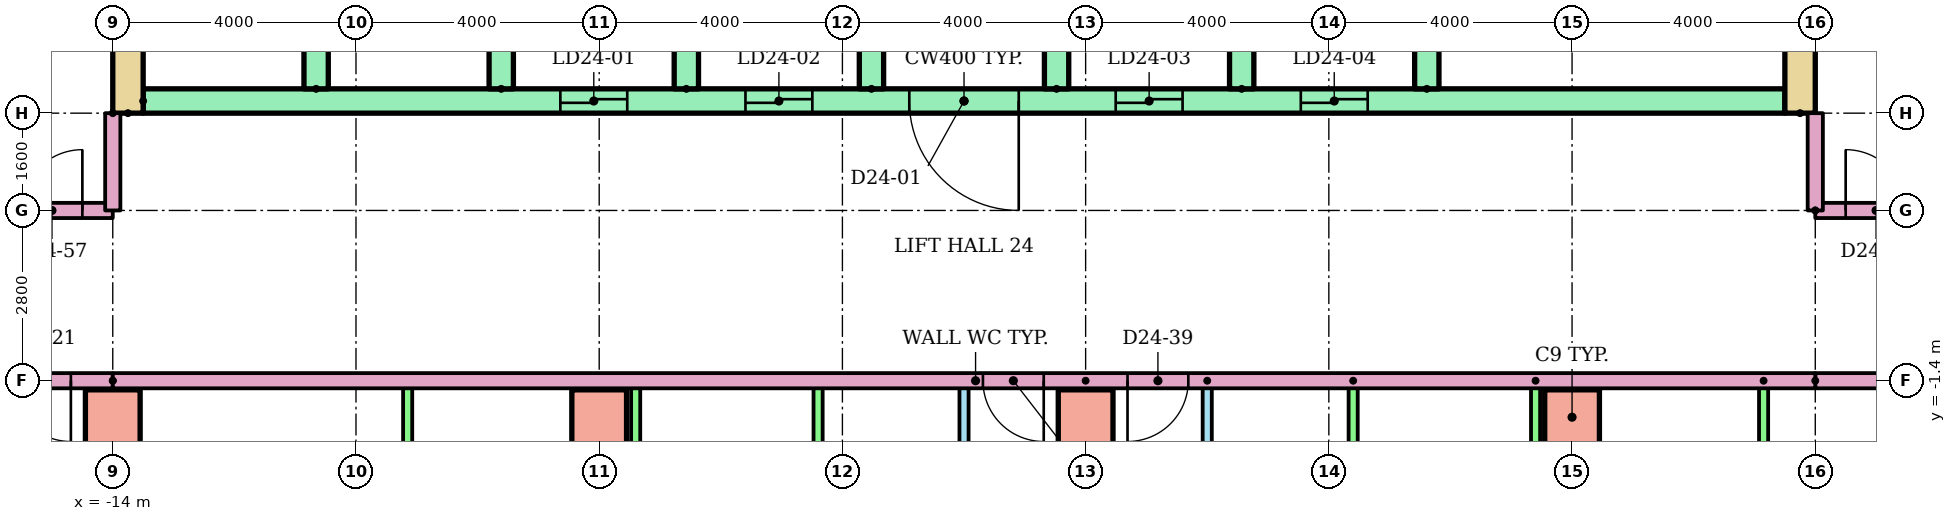
"""IFC4 building model, lengths in metres.
Left out: names, types, materials, properties, quantities, classifications, styles, units other than length and angle.
Written with IfcOpenShell. Run it as: python <this file> out.ifc"""

import sys

from ifc_helpers import new_model, si_unit, direction, frame, frame_2d, origin, origin_2d, place, context, subcontext, project, spatial, rectangle, extrude, element, fill, save


model = new_model("IFC4")
c1 = context("Model", 3, precision=1e-05, world=origin(), true_north=direction((0.0, 1.0)))
c2 = subcontext(c1, "Body", "Model", "MODEL_VIEW")
j1 = project(units=[si_unit("LENGTHUNIT", "METRE"), si_unit("PLANEANGLEUNIT", "RADIAN")], contexts=[c1])
p1 = place(None, origin())
s1 = spatial("IfcSite", under=j1, at=p1, CompositionType="ELEMENT")
p2 = place(p1, origin())
s2 = spatial("IfcBuilding", under=s1, at=p2, CompositionType="ELEMENT")
p3 = place(p2, frame((0.0, 0.0, 93.5)))
s3 = spatial("IfcBuildingStorey", under=s2, at=p3, CompositionType="ELEMENT", Elevation=93.5)
for number, where in (
    (1, (-14.0, -2.0, 0.0)),
    (2, (-6.0, -2.0, 0.0)),
    (3, (2.0, -2.0, 0.0)),
    (4, (10.0, -2.0, 0.0)),
):
    element("IfcColumn", number, at=place(p3, frame(where)), inside=s3, PredefinedType="COLUMN", context=c2, shape_type="SweptSolid", body=[
        extrude(rectangle(XDim=0.9, YDim=0.9, at=origin_2d()), origin(), (0.0, 0.0, 1.0), 3.2),
    ])
for number, where, z_axis, x_axis in (
    (5, (-13.75, 3.0, 0.0), (0.0, 0.0, 1.0), (0.0, 1.0, 0.0)),
    (6, (13.75, 3.0, 0.0), (0.0, 0.0, 1.0), (0.0, 1.0, 0.0)),
):
    element("IfcWall", number, at=place(p3, frame(where, z_axis=z_axis, x_axis=x_axis)), inside=s3, PredefinedType="SHEAR", context=c2, shape_type="SweptSolid", body=[
        extrude(rectangle(XDim=17.0, YDim=0.5, at=frame_2d((8.5, 0.0))), origin(), (0.0, 0.0, 1.0), 2.92),
    ])
p4 = place(p3, frame((-13.5, 3.2, 0.0)))
e7 = element("IfcWall", 7, at=p4, inside=s3, PredefinedType="SHEAR", context=c2, shape_type="SweptSolid", body=[
    extrude(rectangle(XDim=27.0, YDim=0.4, at=frame_2d((13.5, 0.0))), origin(), (0.0, 0.0, 1.0), 2.92),
])
p5 = place(p4, frame((6.861, 0.0, 0.0)))
e8 = element("IfcOpeningElement", 8, at=p5, cuts=e7, PredefinedType="OPENING", context=c2, shape_type="SweptSolid", body=[
    extrude(rectangle(XDim=1.1, YDim=2.1, at=frame_2d((0.55, 1.05))), frame((0.0, 0.21, 0.0), z_axis=(0.0, -1.0, 0.0), x_axis=(1.0, 0.0, 0.0)), (0.0, 0.0, 1.0), 0.42),
])
p6 = place(p4, frame((9.906, 0.0, 0.0)))
e9 = element("IfcOpeningElement", 9, at=p6, cuts=e7, PredefinedType="OPENING", context=c2, shape_type="SweptSolid", body=[
    extrude(rectangle(XDim=1.1, YDim=2.1, at=frame_2d((0.55, 1.05))), frame((0.0, 0.21, 0.0), z_axis=(0.0, -1.0, 0.0), x_axis=(1.0, 0.0, 0.0)), (0.0, 0.0, 1.0), 0.42),
])
p7 = place(p4, frame((15.994, 0.0, 0.0)))
e10 = element("IfcOpeningElement", 10, at=p7, cuts=e7, PredefinedType="OPENING", context=c2, shape_type="SweptSolid", body=[
    extrude(rectangle(XDim=1.1, YDim=2.1, at=frame_2d((0.55, 1.05))), frame((0.0, 0.21, 0.0), z_axis=(0.0, -1.0, 0.0), x_axis=(1.0, 0.0, 0.0)), (0.0, 0.0, 1.0), 0.42),
])
p8 = place(p4, frame((19.039, 0.0, 0.0)))
e11 = element("IfcOpeningElement", 11, at=p8, cuts=e7, PredefinedType="OPENING", context=c2, shape_type="SweptSolid", body=[
    extrude(rectangle(XDim=1.1, YDim=2.1, at=frame_2d((0.55, 1.05))), frame((0.0, 0.21, 0.0), z_axis=(0.0, -1.0, 0.0), x_axis=(1.0, 0.0, 0.0)), (0.0, 0.0, 1.0), 0.42),
])
p9 = place(p4, frame((12.6, 0.0, 0.0)))
e12 = element("IfcOpeningElement", 12, at=p9, cuts=e7, PredefinedType="OPENING", context=c2, shape_type="SweptSolid", body=[
    extrude(rectangle(XDim=1.8, YDim=2.1, at=frame_2d((0.9, 1.05))), frame((0.0, 0.21, 0.0), z_axis=(0.0, -1.0, 0.0), x_axis=(1.0, 0.0, 0.0)), (0.0, 0.0, 1.0), 0.42),
])
for number, where, z_axis, x_axis in (
    (13, (-10.656, 3.4, 0.0), (0.0, 0.0, 1.0), (0.0, 1.0, 0.0)),
    (14, (-7.611, 3.4, 0.0), (0.0, 0.0, 1.0), (0.0, 1.0, 0.0)),
    (15, (-4.567, 3.4, 0.0), (0.0, 0.0, 1.0), (0.0, 1.0, 0.0)),
    (16, (-1.522, 3.4, 0.0), (0.0, 0.0, 1.0), (0.0, 1.0, 0.0)),
    (17, (1.522, 3.4, 0.0), (0.0, 0.0, 1.0), (0.0, 1.0, 0.0)),
    (18, (4.567, 3.4, 0.0), (0.0, 0.0, 1.0), (0.0, 1.0, 0.0)),
    (19, (7.611, 3.4, 0.0), (0.0, 0.0, 1.0), (0.0, 1.0, 0.0)),
):
    element("IfcWall", number, at=place(p3, frame(where, z_axis=z_axis, x_axis=x_axis)), inside=s3, PredefinedType="SHEAR", context=c2, shape_type="SweptSolid", body=[
        extrude(rectangle(XDim=3.0, YDim=0.4, at=frame_2d((1.5, 0.0))), origin(), (0.0, 0.0, 1.0), 2.92),
    ])
p10 = place(p3, frame((0.0, -9.1, 0.0), z_axis=(0.0, 0.0, 1.0), x_axis=(0.0, 1.0, 0.0)))
e20 = element("IfcWall", 20, at=p10, inside=s3, PredefinedType="PARTITIONING", context=c2, shape_type="SweptSolid", body=[
    extrude(rectangle(XDim=7.7, YDim=0.15, at=frame_2d((3.85, 0.0))), origin(), (0.0, 0.0, 1.0), 2.4),
])
p11 = place(p10, frame((5.125, 0.0, 0.0)))
e21 = element("IfcOpeningElement", 21, at=p11, cuts=e20, PredefinedType="OPENING", context=c2, shape_type="SweptSolid", body=[
    extrude(rectangle(XDim=0.9, YDim=2.1, at=frame_2d((0.45, 1.05))), frame((0.0, 0.085, 0.0), z_axis=(0.0, -1.0, 0.0), x_axis=(1.0, 0.0, 0.0)), (0.0, 0.0, 1.0), 0.17),
])
p12 = place(p10, frame((1.325, 0.0, 0.0)))
e22 = element("IfcOpeningElement", 22, at=p12, cuts=e20, PredefinedType="OPENING", context=c2, shape_type="SweptSolid", body=[
    extrude(rectangle(XDim=0.8, YDim=2.1, at=frame_2d((0.4, 1.05))), frame((0.0, 0.085, 0.0), z_axis=(0.0, -1.0, 0.0), x_axis=(1.0, 0.0, 0.0)), (0.0, 0.0, 1.0), 0.17),
])
for number, where, z_axis, x_axis in (
    (23, (-2.4, -9.1, 0.0), (0.0, 0.0, 1.0), (0.0, 1.0, 0.0)),
    (24, (-5.4, -9.1, 0.0), (0.0, 0.0, 1.0), (0.0, 1.0, 0.0)),
    (25, (-9.15, -9.1, 0.0), (0.0, 0.0, 1.0), (0.0, 1.0, 0.0)),
):
    element("IfcWall", number, at=place(p3, frame(where, z_axis=z_axis, x_axis=x_axis)), inside=s3, PredefinedType="PARTITIONING", context=c2, shape_type="SweptSolid", body=[
        extrude(rectangle(XDim=7.7, YDim=0.15, at=frame_2d((3.85, 0.0))), origin(), (0.0, 0.0, 1.0), 2.4),
    ])
p13 = place(p3, frame((-14.0, -1.4, 0.0), z_axis=(0.0, 0.0, 1.0), x_axis=(0.0, -1.0, 0.0)))
e26 = element("IfcWall", 26, at=p13, inside=s3, PredefinedType="PARTITIONING", context=c2, shape_type="SweptSolid", body=[
    extrude(rectangle(XDim=14.81, YDim=0.25, at=frame_2d((7.405, 0.0))), origin(), (0.0, 0.0, 1.0), 2.4),
])
p14 = place(p3, frame((4.0, -1.4, 0.0), z_axis=(0.0, 0.0, 1.0), x_axis=(0.0, -1.0, 0.0)))
e27 = element("IfcWall", 27, at=p14, inside=s3, PredefinedType="PARTITIONING", context=c2, shape_type="SweptSolid", body=[
    extrude(rectangle(XDim=7.7, YDim=0.15, at=frame_2d((3.85, 0.0))), origin(), (0.0, 0.0, 1.0), 2.4),
])
p15 = place(p14, frame((1.675, 0.0, 0.0)))
e28 = element("IfcOpeningElement", 28, at=p15, cuts=e27, PredefinedType="OPENING", context=c2, shape_type="SweptSolid", body=[
    extrude(rectangle(XDim=0.9, YDim=2.1, at=frame_2d((0.45, 1.05))), frame((0.0, 0.085, 0.0), z_axis=(0.0, -1.0, 0.0), x_axis=(1.0, 0.0, 0.0)), (0.0, 0.0, 1.0), 0.17),
])
p16 = place(p14, frame((5.575, 0.0, 0.0)))
e29 = element("IfcOpeningElement", 29, at=p16, cuts=e27, PredefinedType="OPENING", context=c2, shape_type="SweptSolid", body=[
    extrude(rectangle(XDim=0.8, YDim=2.1, at=frame_2d((0.4, 1.05))), frame((0.0, 0.085, 0.0), z_axis=(0.0, -1.0, 0.0), x_axis=(1.0, 0.0, 0.0)), (0.0, 0.0, 1.0), 0.17),
])
for number, where, z_axis, x_axis in (
    (30, (6.4, -1.4, 0.0), (0.0, 0.0, 1.0), (0.0, -1.0, 0.0)),
    (31, (9.4, -1.4, 0.0), (0.0, 0.0, 1.0), (0.0, -1.0, 0.0)),
    (32, (13.15, -1.4, 0.0), (0.0, 0.0, 1.0), (0.0, -1.0, 0.0)),
):
    element("IfcWall", number, at=place(p3, frame(where, z_axis=z_axis, x_axis=x_axis)), inside=s3, PredefinedType="PARTITIONING", context=c2, shape_type="SweptSolid", body=[
        extrude(rectangle(XDim=7.7, YDim=0.15, at=frame_2d((3.85, 0.0))), origin(), (0.0, 0.0, 1.0), 2.4),
    ])
p17 = place(p3, frame((2.0, -1.4, 0.0), z_axis=(0.0, 0.0, 1.0), x_axis=(0.0, -1.0, 0.0)))
e33 = element("IfcWall", 33, at=p17, inside=s3, PredefinedType="PARTITIONING", context=c2, shape_type="SweptSolid", body=[
    extrude(rectangle(XDim=14.81, YDim=0.25, at=frame_2d((7.405, 0.0))), origin(), (0.0, 0.0, 1.0), 2.4),
])
p18 = place(p3, frame((-14.0, -1.4, 0.0), z_axis=(0.0, 0.0, 1.0), x_axis=(-1.0, 0.0, 0.0)))
e34 = element("IfcWall", 34, at=p18, inside=s3, PredefinedType="PARTITIONING", context=c2, shape_type="SweptSolid", body=[
    extrude(rectangle(XDim=14.62, YDim=0.25, at=frame_2d((7.31, 0.0))), origin(), (0.0, 0.0, 1.0), 2.4),
])
p19 = place(p18, frame((0.689, 0.0, 0.0)))
e35 = element("IfcOpeningElement", 35, at=p19, cuts=e34, PredefinedType="OPENING", context=c2, shape_type="SweptSolid", body=[
    extrude(rectangle(XDim=1.0, YDim=2.1, at=frame_2d((0.5, 1.05))), frame((0.0, 0.135, 0.0), z_axis=(0.0, -1.0, 0.0), x_axis=(1.0, 0.0, 0.0)), (0.0, 0.0, 1.0), 0.27),
])
p20 = place(p3, frame((29.0, -1.4, 0.0), z_axis=(0.0, 0.0, 1.0), x_axis=(-1.0, 0.0, 0.0)))
e36 = element("IfcWall", 36, at=p20, inside=s3, PredefinedType="PARTITIONING", context=c2, shape_type="SweptSolid", body=[
    extrude(rectangle(XDim=15.0, YDim=0.25, at=frame_2d((7.5, 0.0))), origin(), (0.0, 0.0, 1.0), 2.4),
])
p21 = place(p20, frame((9.311, 0.0, 0.0)))
e37 = element("IfcOpeningElement", 37, at=p21, cuts=e36, PredefinedType="OPENING", context=c2, shape_type="SweptSolid", body=[
    extrude(rectangle(XDim=1.0, YDim=2.1, at=frame_2d((0.5, 1.05))), frame((0.0, 0.135, 0.0), z_axis=(0.0, -1.0, 0.0), x_axis=(1.0, 0.0, 0.0)), (0.0, 0.0, 1.0), 0.27),
])
p22 = place(p3, frame((-28.62, 1.4, 0.0)))
e38 = element("IfcWall", 38, at=p22, inside=s3, PredefinedType="PARTITIONING", context=c2, shape_type="SweptSolid", body=[
    extrude(rectangle(XDim=14.62, YDim=0.25, at=frame_2d((7.31, 0.0))), origin(), (0.0, 0.0, 1.0), 2.4),
])
p23 = place(p22, frame((13.12, 0.0, 0.0)))
e39 = element("IfcOpeningElement", 39, at=p23, cuts=e38, PredefinedType="OPENING", context=c2, shape_type="SweptSolid", body=[
    extrude(rectangle(XDim=1.0, YDim=2.1, at=frame_2d((0.5, 1.05))), frame((0.0, 0.135, 0.0), z_axis=(0.0, -1.0, 0.0), x_axis=(1.0, 0.0, 0.0)), (0.0, 0.0, 1.0), 0.27),
])
p24 = place(p3, frame((14.0, 1.4, 0.0)))
e40 = element("IfcWall", 40, at=p24, inside=s3, PredefinedType="PARTITIONING", context=c2, shape_type="SweptSolid", body=[
    extrude(rectangle(XDim=15.0, YDim=0.25, at=frame_2d((7.5, 0.0))), origin(), (0.0, 0.0, 1.0), 2.4),
])
p25 = place(p24, frame((0.5, 0.0, 0.0)))
e41 = element("IfcOpeningElement", 41, at=p25, cuts=e40, PredefinedType="OPENING", context=c2, shape_type="SweptSolid", body=[
    extrude(rectangle(XDim=1.0, YDim=2.1, at=frame_2d((0.5, 1.05))), frame((0.0, 0.135, 0.0), z_axis=(0.0, -1.0, 0.0), x_axis=(1.0, 0.0, 0.0)), (0.0, 0.0, 1.0), 0.27),
])
p26 = place(p24, frame((12.689, 0.0, 0.0)))
e42 = element("IfcOpeningElement", 42, at=p26, cuts=e40, PredefinedType="OPENING", context=c2, shape_type="SweptSolid", body=[
    extrude(rectangle(XDim=1.0, YDim=2.1, at=frame_2d((0.5, 1.05))), frame((0.0, 0.135, 0.0), z_axis=(0.0, -1.0, 0.0), x_axis=(1.0, 0.0, 0.0)), (0.0, 0.0, 1.0), 0.27),
])
p27 = place(p3, frame((14.0, -1.4, 0.0), z_axis=(0.0, 0.0, 1.0), x_axis=(-1.0, 0.0, 0.0)))
e43 = element("IfcWall", 43, at=p27, inside=s3, PredefinedType="PARTITIONING", context=c2, shape_type="SweptSolid", body=[
    extrude(rectangle(XDim=28.0, YDim=0.25, at=frame_2d((14.0, 0.0))), origin(), (0.0, 0.0, 1.0), 2.4),
])
p28 = place(p27, frame((12.689, 0.0, 0.0)))
e44 = element("IfcOpeningElement", 44, at=p28, cuts=e43, PredefinedType="OPENING", context=c2, shape_type="SweptSolid", body=[
    extrude(rectangle(XDim=1.0, YDim=2.1, at=frame_2d((0.5, 1.05))), frame((0.0, 0.135, 0.0), z_axis=(0.0, -1.0, 0.0), x_axis=(1.0, 0.0, 0.0)), (0.0, 0.0, 1.0), 0.27),
])
p29 = place(p27, frame((10.311, 0.0, 0.0)))
e45 = element("IfcOpeningElement", 45, at=p29, cuts=e43, PredefinedType="OPENING", context=c2, shape_type="SweptSolid", body=[
    extrude(rectangle(XDim=1.0, YDim=2.1, at=frame_2d((0.5, 1.05))), frame((0.0, 0.135, 0.0), z_axis=(0.0, -1.0, 0.0), x_axis=(1.0, 0.0, 0.0)), (0.0, 0.0, 1.0), 0.27),
])
for number, where, z_axis, x_axis in (
    (46, (-14.0, 3.0, 0.0), (0.0, 0.0, 1.0), (0.0, -1.0, 0.0)),
    (47, (14.0, 1.4, 0.0), (0.0, 0.0, 1.0), (0.0, 1.0, 0.0)),
):
    element("IfcWall", number, at=place(p3, frame(where, z_axis=z_axis, x_axis=x_axis)), inside=s3, PredefinedType="PARTITIONING", context=c2, shape_type="SweptSolid", body=[
        extrude(rectangle(XDim=1.6, YDim=0.25, at=frame_2d((0.8, 0.0))), origin(), (0.0, 0.0, 1.0), 2.4),
    ])
p30 = place(p5, origin())
e48 = element("IfcDoor", 48, at=p30, inside=s3, OperationType="SLIDING_TO_LEFT", PredefinedType="DOOR", context=c2, shape_type="SweptSolid", body=[
    extrude(rectangle(XDim=1.1, YDim=2.1, at=frame_2d((0.55, 1.05))), frame((0.0, 0.025, 0.0), z_axis=(0.0, -1.0, 0.0), x_axis=(1.0, 0.0, 0.0)), (0.0, 0.0, 1.0), 0.05),
])
fill(e8, e48)
p31 = place(p6, origin())
e49 = element("IfcDoor", 49, at=p31, inside=s3, OperationType="SLIDING_TO_LEFT", PredefinedType="DOOR", context=c2, shape_type="SweptSolid", body=[
    extrude(rectangle(XDim=1.1, YDim=2.1, at=frame_2d((0.55, 1.05))), frame((0.0, 0.025, 0.0), z_axis=(0.0, -1.0, 0.0), x_axis=(1.0, 0.0, 0.0)), (0.0, 0.0, 1.0), 0.05),
])
fill(e9, e49)
p32 = place(p7, origin())
e50 = element("IfcDoor", 50, at=p32, inside=s3, OperationType="SLIDING_TO_LEFT", PredefinedType="DOOR", context=c2, shape_type="SweptSolid", body=[
    extrude(rectangle(XDim=1.1, YDim=2.1, at=frame_2d((0.55, 1.05))), frame((0.0, 0.025, 0.0), z_axis=(0.0, -1.0, 0.0), x_axis=(1.0, 0.0, 0.0)), (0.0, 0.0, 1.0), 0.05),
])
fill(e10, e50)
p33 = place(p8, origin())
e51 = element("IfcDoor", 51, at=p33, inside=s3, OperationType="SLIDING_TO_LEFT", PredefinedType="DOOR", context=c2, shape_type="SweptSolid", body=[
    extrude(rectangle(XDim=1.1, YDim=2.1, at=frame_2d((0.55, 1.05))), frame((0.0, 0.025, 0.0), z_axis=(0.0, -1.0, 0.0), x_axis=(1.0, 0.0, 0.0)), (0.0, 0.0, 1.0), 0.05),
])
fill(e11, e51)
p34 = place(p9, frame((1.8, 0.0, 0.0), z_axis=(0.0, 0.0, 1.0), x_axis=(-1.0, 0.0, 0.0)))
e52 = element("IfcDoor", 52, at=p34, inside=s3, OperationType="DOUBLE_DOOR_SINGLE_SWING", PredefinedType="DOOR", context=c2, shape_type="SweptSolid", body=[
    extrude(rectangle(XDim=1.8, YDim=2.1, at=frame_2d((0.9, 1.05))), frame((0.0, 0.025, 0.0), z_axis=(0.0, -1.0, 0.0), x_axis=(1.0, 0.0, 0.0)), (0.0, 0.0, 1.0), 0.05),
])
fill(e12, e52)
p35 = place(p19, origin())
e53 = element("IfcDoor", 53, at=p35, inside=s3, OperationType="SINGLE_SWING_LEFT", PredefinedType="DOOR", context=c2, shape_type="SweptSolid", body=[
    extrude(rectangle(XDim=1.0, YDim=2.1, at=frame_2d((0.5, 1.05))), frame((0.0, 0.025, 0.0), z_axis=(0.0, -1.0, 0.0), x_axis=(1.0, 0.0, 0.0)), (0.0, 0.0, 1.0), 0.05),
])
fill(e35, e53)
p36 = place(p28, origin())
e54 = element("IfcDoor", 54, at=p36, inside=s3, OperationType="SINGLE_SWING_LEFT", PredefinedType="DOOR", context=c2, shape_type="SweptSolid", body=[
    extrude(rectangle(XDim=1.0, YDim=2.1, at=frame_2d((0.5, 1.05))), frame((0.0, 0.025, 0.0), z_axis=(0.0, -1.0, 0.0), x_axis=(1.0, 0.0, 0.0)), (0.0, 0.0, 1.0), 0.05),
])
fill(e44, e54)
p37 = place(p29, origin())
e55 = element("IfcDoor", 55, at=p37, inside=s3, OperationType="SINGLE_SWING_RIGHT", PredefinedType="DOOR", context=c2, shape_type="SweptSolid", body=[
    extrude(rectangle(XDim=1.0, YDim=2.1, at=frame_2d((0.5, 1.05))), frame((0.0, 0.025, 0.0), z_axis=(0.0, -1.0, 0.0), x_axis=(1.0, 0.0, 0.0)), (0.0, 0.0, 1.0), 0.05),
])
fill(e45, e55)
p38 = place(p23, origin())
e56 = element("IfcDoor", 56, at=p38, inside=s3, OperationType="SINGLE_SWING_RIGHT", PredefinedType="DOOR", context=c2, shape_type="SweptSolid", body=[
    extrude(rectangle(XDim=1.0, YDim=2.1, at=frame_2d((0.5, 1.05))), frame((0.0, 0.025, 0.0), z_axis=(0.0, -1.0, 0.0), x_axis=(1.0, 0.0, 0.0)), (0.0, 0.0, 1.0), 0.05),
])
fill(e39, e56)
p39 = place(p25, origin())
e57 = element("IfcDoor", 57, at=p39, inside=s3, OperationType="SINGLE_SWING_LEFT", PredefinedType="DOOR", context=c2, shape_type="SweptSolid", body=[
    extrude(rectangle(XDim=1.0, YDim=2.1, at=frame_2d((0.5, 1.05))), frame((0.0, 0.025, 0.0), z_axis=(0.0, -1.0, 0.0), x_axis=(1.0, 0.0, 0.0)), (0.0, 0.0, 1.0), 0.05),
])
fill(e41, e57)
save(model, sys.argv[1])
